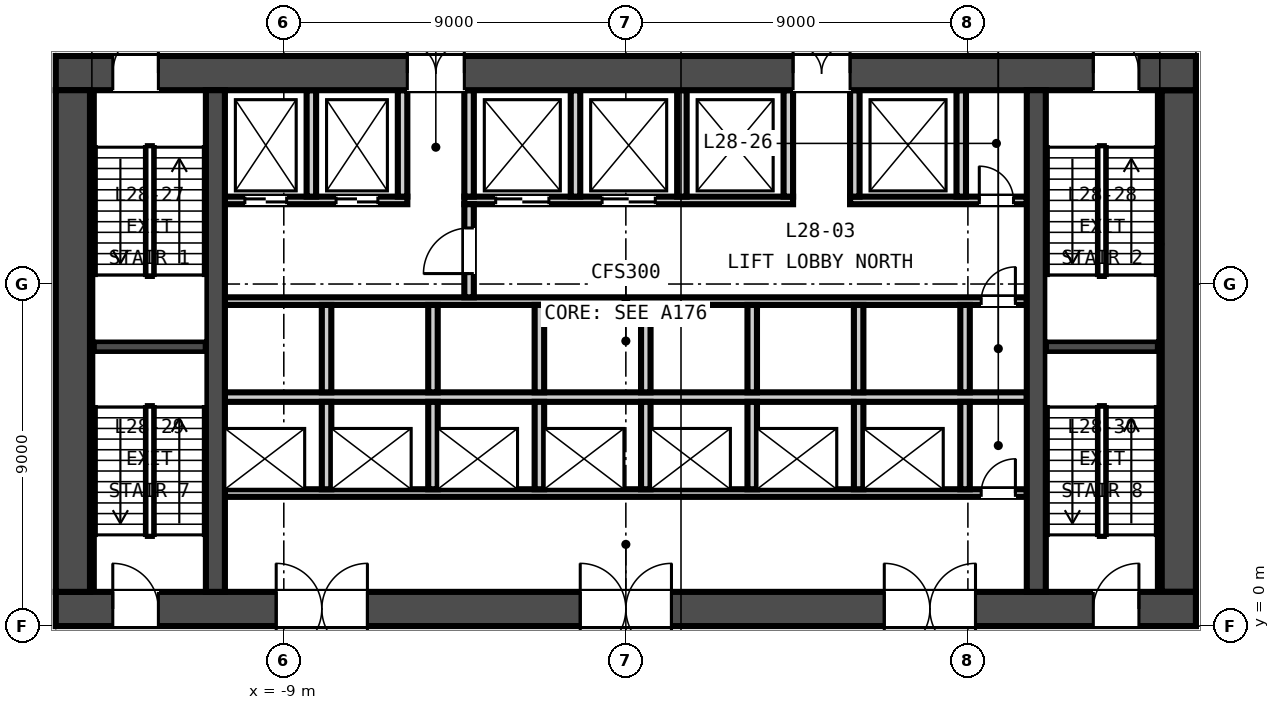
"""IFC4 building model, lengths in metres.
Left out: names, types, materials, properties, quantities, classifications, styles, units other than length and angle.
Written with IfcOpenShell. Run it as: python <this file> out.ifc"""

import sys

from ifc_helpers import new_model, si_unit, direction, frame, frame_2d, origin, place, context, subcontext, project, spatial, rectangle, extrude, element, fill, save


model = new_model("IFC4")
c1 = context("Model", 3, precision=1e-05, world=origin(), true_north=direction((0.0, 1.0)))
c2 = subcontext(c1, "Body", "Model", "MODEL_VIEW")
j1 = project(units=[si_unit("LENGTHUNIT", "METRE"), si_unit("PLANEANGLEUNIT", "RADIAN")], contexts=[c1])
p1 = place(None, origin())
s1 = spatial("IfcSite", under=j1, at=p1, CompositionType="ELEMENT")
p2 = place(p1, origin())
s2 = spatial("IfcBuilding", under=s1, at=p2, CompositionType="ELEMENT")
p3 = place(p2, frame((0.0, 0.0, 117.15)))
s3 = spatial("IfcBuildingStorey", under=s2, at=p3, CompositionType="ELEMENT", Elevation=117.15)
p4 = place(p3, frame((-15.0, 0.45, -0.3), z_axis=(0.0, 0.0, 1.0), x_axis=(1.0, 0.0, 0.0)))
e1 = element("IfcWall", 1, at=p4, inside=s3, PredefinedType="SOLIDWALL", context=c2, shape_type="SweptSolid", body=[
    extrude(rectangle(XDim=30.0, YDim=0.9, at=frame_2d((15.0, 0.0))), origin(), (0.0, 0.0, 1.0), 4.5),
])
p5 = place(p4, frame((5.8, 0.0, 0.3)))
e2 = element("IfcOpeningElement", 2, at=p5, cuts=e1, PredefinedType="OPENING", context=c2, shape_type="SweptSolid", body=[
    extrude(rectangle(XDim=2.4, YDim=2.4, at=frame_2d((1.2, 1.2))), frame((0.0, 0.46, 0.0), z_axis=(0.0, -1.0, 0.0), x_axis=(1.0, 0.0, 0.0)), (0.0, 0.0, 1.0), 0.92),
])
p6 = place(p4, frame((13.8, 0.0, 0.3)))
e3 = element("IfcOpeningElement", 3, at=p6, cuts=e1, PredefinedType="OPENING", context=c2, shape_type="SweptSolid", body=[
    extrude(rectangle(XDim=2.4, YDim=2.4, at=frame_2d((1.2, 1.2))), frame((0.0, 0.46, 0.0), z_axis=(0.0, -1.0, 0.0), x_axis=(1.0, 0.0, 0.0)), (0.0, 0.0, 1.0), 0.92),
])
p7 = place(p4, frame((21.8, 0.0, 0.3)))
e4 = element("IfcOpeningElement", 4, at=p7, cuts=e1, PredefinedType="OPENING", context=c2, shape_type="SweptSolid", body=[
    extrude(rectangle(XDim=2.4, YDim=2.4, at=frame_2d((1.2, 1.2))), frame((0.0, 0.46, 0.0), z_axis=(0.0, -1.0, 0.0), x_axis=(1.0, 0.0, 0.0)), (0.0, 0.0, 1.0), 0.92),
])
p8 = place(p4, frame((1.5, 0.0, 0.3)))
e5 = element("IfcOpeningElement", 5, at=p8, cuts=e1, PredefinedType="OPENING", context=c2, shape_type="SweptSolid", body=[
    extrude(rectangle(XDim=1.2, YDim=2.1, at=frame_2d((0.6, 1.05))), frame((0.0, 0.46, 0.0), z_axis=(0.0, -1.0, 0.0), x_axis=(1.0, 0.0, 0.0)), (0.0, 0.0, 1.0), 0.92),
])
p9 = place(p4, frame((27.3, 0.0, 0.3)))
e6 = element("IfcOpeningElement", 6, at=p9, cuts=e1, PredefinedType="OPENING", context=c2, shape_type="SweptSolid", body=[
    extrude(rectangle(XDim=1.2, YDim=2.1, at=frame_2d((0.6, 1.05))), frame((0.0, 0.46, 0.0), z_axis=(0.0, -1.0, 0.0), x_axis=(1.0, 0.0, 0.0)), (0.0, 0.0, 1.0), 0.92),
])
p10 = place(p3, frame((-15.0, 14.55, -0.3), z_axis=(0.0, 0.0, 1.0), x_axis=(1.0, 0.0, 0.0)))
e7 = element("IfcWall", 7, at=p10, inside=s3, PredefinedType="SOLIDWALL", context=c2, shape_type="SweptSolid", body=[
    extrude(rectangle(XDim=30.0, YDim=0.9, at=frame_2d((15.0, 0.0))), origin(), (0.0, 0.0, 1.0), 4.5),
])
p11 = place(p10, frame((9.25, 0.0, 0.3)))
e8 = element("IfcOpeningElement", 8, at=p11, cuts=e7, PredefinedType="OPENING", context=c2, shape_type="SweptSolid", body=[
    extrude(rectangle(XDim=1.5, YDim=2.1, at=frame_2d((0.75, 1.05))), frame((0.0, 0.46, 0.0), z_axis=(0.0, -1.0, 0.0), x_axis=(1.0, 0.0, 0.0)), (0.0, 0.0, 1.0), 0.92),
])
p12 = place(p10, frame((19.4, 0.0, 0.3)))
e9 = element("IfcOpeningElement", 9, at=p12, cuts=e7, PredefinedType="OPENING", context=c2, shape_type="SweptSolid", body=[
    extrude(rectangle(XDim=1.5, YDim=2.1, at=frame_2d((0.75, 1.05))), frame((0.0, 0.46, 0.0), z_axis=(0.0, -1.0, 0.0), x_axis=(1.0, 0.0, 0.0)), (0.0, 0.0, 1.0), 0.92),
])
p13 = place(p10, frame((1.5, 0.0, 0.3)))
e10 = element("IfcOpeningElement", 10, at=p13, cuts=e7, PredefinedType="OPENING", context=c2, shape_type="SweptSolid", body=[
    extrude(rectangle(XDim=1.2, YDim=2.1, at=frame_2d((0.6, 1.05))), frame((0.0, 0.46, 0.0), z_axis=(0.0, -1.0, 0.0), x_axis=(1.0, 0.0, 0.0)), (0.0, 0.0, 1.0), 0.92),
])
p14 = place(p10, frame((27.3, 0.0, 0.3)))
e11 = element("IfcOpeningElement", 11, at=p14, cuts=e7, PredefinedType="OPENING", context=c2, shape_type="SweptSolid", body=[
    extrude(rectangle(XDim=1.2, YDim=2.1, at=frame_2d((0.6, 1.05))), frame((0.0, 0.46, 0.0), z_axis=(0.0, -1.0, 0.0), x_axis=(1.0, 0.0, 0.0)), (0.0, 0.0, 1.0), 0.92),
])
for number, where, z_axis, x_axis in (
    (12, (-14.55, 0.9, -0.3), (0.0, 0.0, 1.0), (0.0, 1.0, 0.0)),
    (13, (14.55, 0.9, -0.3), (0.0, 0.0, 1.0), (0.0, 1.0, 0.0)),
):
    element("IfcWall", number, at=place(p3, frame(where, z_axis=z_axis, x_axis=x_axis)), inside=s3, PredefinedType="SOLIDWALL", context=c2, shape_type="SweptSolid", body=[
        extrude(rectangle(XDim=13.2, YDim=0.9, at=frame_2d((6.6, 0.0))), origin(), (0.0, 0.0, 1.0), 4.5),
    ])
for number, where, z_axis, x_axis in (
    (14, (-10.8, 0.9, -0.3), (0.0, 0.0, 1.0), (0.0, 1.0, 0.0)),
    (15, (10.8, 0.9, -0.3), (0.0, 0.0, 1.0), (0.0, 1.0, 0.0)),
):
    element("IfcWall", number, at=place(p3, frame(where, z_axis=z_axis, x_axis=x_axis)), inside=s3, PredefinedType="SOLIDWALL", context=c2, shape_type="SweptSolid", body=[
        extrude(rectangle(XDim=13.2, YDim=0.5, at=frame_2d((6.6, 0.0))), origin(), (0.0, 0.0, 1.0), 4.5),
    ])
p15 = place(p3, frame((-10.55, 3.5, 0.0), z_axis=(0.0, 0.0, 1.0), x_axis=(1.0, 0.0, 0.0)))
e16 = element("IfcWall", 16, at=p15, inside=s3, PredefinedType="PARTITIONING", context=c2, shape_type="SweptSolid", body=[
    extrude(rectangle(XDim=21.1, YDim=0.2, at=frame_2d((10.55, 0.0))), origin(), (0.0, 0.0, 1.0), 4.2),
])
p16 = place(p15, frame((19.9, 0.0, 0.0)))
e17 = element("IfcOpeningElement", 17, at=p16, cuts=e16, PredefinedType="OPENING", context=c2, shape_type="SweptSolid", body=[
    extrude(rectangle(XDim=0.9, YDim=2.1, at=frame_2d((0.45, 1.05))), frame((0.0, 0.11, 0.0), z_axis=(0.0, -1.0, 0.0), x_axis=(1.0, 0.0, 0.0)), (0.0, 0.0, 1.0), 0.22),
])
p17 = place(p3, frame((-10.55, 6.025, 0.0), z_axis=(0.0, 0.0, 1.0), x_axis=(1.0, 0.0, 0.0)))
e18 = element("IfcWall", 18, at=p17, inside=s3, PredefinedType="PARTITIONING", context=c2, shape_type="SweptSolid", body=[
    extrude(rectangle(XDim=21.1, YDim=0.25, at=frame_2d((10.55, 0.0))), origin(), (0.0, 0.0, 1.0), 4.2),
])
p18 = place(p3, frame((-10.55, 8.55, 0.0), z_axis=(0.0, 0.0, 1.0), x_axis=(1.0, 0.0, 0.0)))
e19 = element("IfcWall", 19, at=p18, inside=s3, PredefinedType="PARTITIONING", context=c2, shape_type="SweptSolid", body=[
    extrude(rectangle(XDim=21.1, YDim=0.2, at=frame_2d((10.55, 0.0))), origin(), (0.0, 0.0, 1.0), 4.2),
])
p19 = place(p18, frame((19.9, 0.0, 0.0)))
e20 = element("IfcOpeningElement", 20, at=p19, cuts=e19, PredefinedType="OPENING", context=c2, shape_type="SweptSolid", body=[
    extrude(rectangle(XDim=0.9, YDim=2.1, at=frame_2d((0.45, 1.05))), frame((0.0, 0.11, 0.0), z_axis=(0.0, -1.0, 0.0), x_axis=(1.0, 0.0, 0.0)), (0.0, 0.0, 1.0), 0.22),
])
p20 = place(p3, frame((-10.55, 11.2, 0.0), z_axis=(0.0, 0.0, 1.0), x_axis=(1.0, 0.0, 0.0)))
e21 = element("IfcWall", 21, at=p20, inside=s3, PredefinedType="PARTITIONING", context=c2, shape_type="SweptSolid", body=[
    extrude(rectangle(XDim=4.8, YDim=0.2, at=frame_2d((2.4, 0.0))), origin(), (0.0, 0.0, 1.0), 4.2),
])
p21 = place(p20, frame((0.525, 0.0, 0.0)))
e22 = element("IfcOpeningElement", 22, at=p21, cuts=e21, PredefinedType="OPENING", context=c2, shape_type="SweptSolid", body=[
    extrude(rectangle(XDim=1.1, YDim=2.1, at=frame_2d((0.55, 1.05))), frame((0.0, 0.11, 0.0), z_axis=(0.0, -1.0, 0.0), x_axis=(1.0, 0.0, 0.0)), (0.0, 0.0, 1.0), 0.22),
])
p22 = place(p20, frame((2.925, 0.0, 0.0)))
e23 = element("IfcOpeningElement", 23, at=p22, cuts=e21, PredefinedType="OPENING", context=c2, shape_type="SweptSolid", body=[
    extrude(rectangle(XDim=1.1, YDim=2.1, at=frame_2d((0.55, 1.05))), frame((0.0, 0.11, 0.0), z_axis=(0.0, -1.0, 0.0), x_axis=(1.0, 0.0, 0.0)), (0.0, 0.0, 1.0), 0.22),
])
p23 = place(p3, frame((-4.25, 11.2, 0.0), z_axis=(0.0, 0.0, 1.0), x_axis=(1.0, 0.0, 0.0)))
e24 = element("IfcWall", 24, at=p23, inside=s3, PredefinedType="PARTITIONING", context=c2, shape_type="SweptSolid", body=[
    extrude(rectangle(XDim=8.65, YDim=0.2, at=frame_2d((4.325, 0.0))), origin(), (0.0, 0.0, 1.0), 4.2),
])
p24 = place(p23, frame((0.825, 0.0, 0.0)))
e25 = element("IfcOpeningElement", 25, at=p24, cuts=e24, PredefinedType="OPENING", context=c2, shape_type="SweptSolid", body=[
    extrude(rectangle(XDim=1.4, YDim=2.1, at=frame_2d((0.7, 1.05))), frame((0.0, 0.11, 0.0), z_axis=(0.0, -1.0, 0.0), x_axis=(1.0, 0.0, 0.0)), (0.0, 0.0, 1.0), 0.22),
])
p25 = place(p23, frame((3.625, 0.0, 0.0)))
e26 = element("IfcOpeningElement", 26, at=p25, cuts=e24, PredefinedType="OPENING", context=c2, shape_type="SweptSolid", body=[
    extrude(rectangle(XDim=1.4, YDim=2.1, at=frame_2d((0.7, 1.05))), frame((0.0, 0.11, 0.0), z_axis=(0.0, -1.0, 0.0), x_axis=(1.0, 0.0, 0.0)), (0.0, 0.0, 1.0), 0.22),
])
p26 = place(p3, frame((5.9, 11.2, 0.0), z_axis=(0.0, 0.0, 1.0), x_axis=(1.0, 0.0, 0.0)))
e27 = element("IfcWall", 27, at=p26, inside=s3, PredefinedType="PARTITIONING", context=c2, shape_type="SweptSolid", body=[
    extrude(rectangle(XDim=4.65, YDim=0.2, at=frame_2d((2.325, 0.0))), origin(), (0.0, 0.0, 1.0), 4.2),
])
p27 = place(p26, frame((3.4, 0.0, 0.0)))
e28 = element("IfcOpeningElement", 28, at=p27, cuts=e27, PredefinedType="OPENING", context=c2, shape_type="SweptSolid", body=[
    extrude(rectangle(XDim=0.9, YDim=2.1, at=frame_2d((0.45, 1.05))), frame((0.0, 0.11, 0.0), z_axis=(0.0, -1.0, 0.0), x_axis=(1.0, 0.0, 0.0)), (0.0, 0.0, 1.0), 0.22),
])
p28 = place(p3, frame((-4.125, 8.65, 0.0), z_axis=(0.0, 0.0, 1.0), x_axis=(0.0, 1.0, 0.0)))
e29 = element("IfcWall", 29, at=p28, inside=s3, PredefinedType="PARTITIONING", context=c2, shape_type="SweptSolid", body=[
    extrude(rectangle(XDim=2.45, YDim=0.25, at=frame_2d((1.225, 0.0))), origin(), (0.0, 0.0, 1.0), 4.2),
])
p29 = place(p28, frame((0.625, 0.0, 0.0)))
e30 = element("IfcOpeningElement", 30, at=p29, cuts=e29, PredefinedType="OPENING", context=c2, shape_type="SweptSolid", body=[
    extrude(rectangle(XDim=1.2, YDim=2.1, at=frame_2d((0.6, 1.05))), frame((0.0, 0.135, 0.0), z_axis=(0.0, -1.0, 0.0), x_axis=(1.0, 0.0, 0.0)), (0.0, 0.0, 1.0), 0.27),
])
for number, where, z_axis, x_axis in (
    (31, (-7.875, 3.6, 0.0), (0.0, 0.0, 1.0), (0.0, 1.0, 0.0)),
    (32, (-5.075, 3.6, 0.0), (0.0, 0.0, 1.0), (0.0, 1.0, 0.0)),
    (33, (-2.275, 3.6, 0.0), (0.0, 0.0, 1.0), (0.0, 1.0, 0.0)),
    (34, (0.525, 3.6, 0.0), (0.0, 0.0, 1.0), (0.0, 1.0, 0.0)),
    (35, (3.325, 3.6, 0.0), (0.0, 0.0, 1.0), (0.0, 1.0, 0.0)),
    (36, (6.125, 3.6, 0.0), (0.0, 0.0, 1.0), (0.0, 1.0, 0.0)),
    (37, (8.925, 3.6, 0.0), (0.0, 0.0, 1.0), (0.0, 1.0, 0.0)),
):
    element("IfcWall", number, at=place(p3, frame(where, z_axis=z_axis, x_axis=x_axis)), inside=s3, PredefinedType="PARTITIONING", context=c2, shape_type="SweptSolid", body=[
        extrude(rectangle(XDim=2.3, YDim=0.25, at=frame_2d((1.15, 0.0))), origin(), (0.0, 0.0, 1.0), 4.2),
    ])
for number, where, z_axis, x_axis in (
    (38, (-7.875, 6.15, 0.0), (0.0, 0.0, 1.0), (0.0, 1.0, 0.0)),
    (39, (-5.075, 6.15, 0.0), (0.0, 0.0, 1.0), (0.0, 1.0, 0.0)),
    (40, (-2.275, 6.15, 0.0), (0.0, 0.0, 1.0), (0.0, 1.0, 0.0)),
    (41, (0.525, 6.15, 0.0), (0.0, 0.0, 1.0), (0.0, 1.0, 0.0)),
    (42, (3.325, 6.15, 0.0), (0.0, 0.0, 1.0), (0.0, 1.0, 0.0)),
    (43, (6.125, 6.15, 0.0), (0.0, 0.0, 1.0), (0.0, 1.0, 0.0)),
    (44, (8.925, 6.15, 0.0), (0.0, 0.0, 1.0), (0.0, 1.0, 0.0)),
):
    element("IfcWall", number, at=place(p3, frame(where, z_axis=z_axis, x_axis=x_axis)), inside=s3, PredefinedType="PARTITIONING", context=c2, shape_type="SweptSolid", body=[
        extrude(rectangle(XDim=2.3, YDim=0.25, at=frame_2d((1.15, 0.0))), origin(), (0.0, 0.0, 1.0), 4.2),
    ])
for number, where, z_axis, x_axis in (
    (45, (-8.275, 11.3, 0.0), (0.0, 0.0, 1.0), (0.0, 1.0, 0.0)),
    (46, (-5.875, 11.3, 0.0), (0.0, 0.0, 1.0), (0.0, 1.0, 0.0)),
    (47, (-4.125, 11.3, 0.0), (0.0, 0.0, 1.0), (0.0, 1.0, 0.0)),
    (48, (-1.325, 11.3, 0.0), (0.0, 0.0, 1.0), (0.0, 1.0, 0.0)),
    (49, (1.475, 11.3, 0.0), (0.0, 0.0, 1.0), (0.0, 1.0, 0.0)),
    (50, (4.275, 11.3, 0.0), (0.0, 0.0, 1.0), (0.0, 1.0, 0.0)),
    (51, (6.025, 11.3, 0.0), (0.0, 0.0, 1.0), (0.0, 1.0, 0.0)),
    (52, (8.825, 11.3, 0.0), (0.0, 0.0, 1.0), (0.0, 1.0, 0.0)),
):
    element("IfcWall", number, at=place(p3, frame(where, z_axis=z_axis, x_axis=x_axis)), inside=s3, PredefinedType="PARTITIONING", context=c2, shape_type="SweptSolid", body=[
        extrude(rectangle(XDim=2.8, YDim=0.25, at=frame_2d((1.4, 0.0))), origin(), (0.0, 0.0, 1.0), 4.2),
    ])
p30 = place(p3, frame((-14.0, 7.35, 0.0), z_axis=(0.0, 0.0, 1.0), x_axis=(1.0, 0.0, 0.0)))
e53 = element("IfcWall", 53, at=p30, inside=s3, PredefinedType="SOLIDWALL", context=c2, shape_type="SweptSolid", body=[
    extrude(rectangle(XDim=2.95, YDim=0.3, at=frame_2d((1.475, 0.0))), origin(), (0.0, 0.0, 1.0), 4.2),
])
p31 = place(p3, frame((-14.05, 0.9, 0.0), z_axis=(0.0, 0.0, 1.0), x_axis=(0.0, 1.0, 0.0)))
e54 = element("IfcWall", 54, at=p31, inside=s3, PredefinedType="SOLIDWALL", context=c2, shape_type="SweptSolid", body=[
    extrude(rectangle(XDim=13.2, YDim=0.1, at=frame_2d((6.6, 0.0))), origin(), (0.0, 0.0, 1.0), 4.2),
])
p32 = place(p3, frame((11.05, 7.35, 0.0), z_axis=(0.0, 0.0, 1.0), x_axis=(1.0, 0.0, 0.0)))
e55 = element("IfcWall", 55, at=p32, inside=s3, PredefinedType="SOLIDWALL", context=c2, shape_type="SweptSolid", body=[
    extrude(rectangle(XDim=2.95, YDim=0.3, at=frame_2d((1.475, 0.0))), origin(), (0.0, 0.0, 1.0), 4.2),
])
p33 = place(p3, frame((14.05, 0.9, 0.0), z_axis=(0.0, 0.0, 1.0), x_axis=(0.0, 1.0, 0.0)))
e56 = element("IfcWall", 56, at=p33, inside=s3, PredefinedType="SOLIDWALL", context=c2, shape_type="SweptSolid", body=[
    extrude(rectangle(XDim=13.2, YDim=0.1, at=frame_2d((6.6, 0.0))), origin(), (0.0, 0.0, 1.0), 4.2),
])
p34 = place(p3, frame((14.924, 30.353, 0.0), z_axis=(0.0, 0.0, 1.0), x_axis=(0.669133646521, -0.743142088092, 0.0)))
e57 = element("IfcWall", 57, at=p34, inside=s3, PredefinedType="PARTITIONING", context=c2, shape_type="SweptSolid", body=[
    extrude(rectangle(XDim=34.413, YDim=0.2, at=frame_2d((17.207, 0.0))), origin(), (0.0, 0.0, 1.0), 4.2),
])
p35 = place(p29, origin())
e58 = element("IfcDoor", 58, at=p35, inside=s3, OperationType="SINGLE_SWING_LEFT", PredefinedType="DOOR", context=c2, shape_type="SweptSolid", body=[
    extrude(rectangle(XDim=1.2, YDim=2.1, at=frame_2d((0.6, 1.05))), frame((0.0, 0.025, 0.0), z_axis=(0.0, -1.0, 0.0), x_axis=(1.0, 0.0, 0.0)), (0.0, 0.0, 1.0), 0.05),
])
fill(e30, e58)
p36 = place(p16, origin())
e59 = element("IfcDoor", 59, at=p36, inside=s3, OperationType="SINGLE_SWING_RIGHT", PredefinedType="DOOR", context=c2, shape_type="SweptSolid", body=[
    extrude(rectangle(XDim=0.9, YDim=2.1, at=frame_2d((0.45, 1.05))), frame((0.0, 0.025, 0.0), z_axis=(0.0, -1.0, 0.0), x_axis=(1.0, 0.0, 0.0)), (0.0, 0.0, 1.0), 0.05),
])
fill(e17, e59)
p37 = place(p19, origin())
e60 = element("IfcDoor", 60, at=p37, inside=s3, OperationType="SINGLE_SWING_RIGHT", PredefinedType="DOOR", context=c2, shape_type="SweptSolid", body=[
    extrude(rectangle(XDim=0.9, YDim=2.1, at=frame_2d((0.45, 1.05))), frame((0.0, 0.025, 0.0), z_axis=(0.0, -1.0, 0.0), x_axis=(1.0, 0.0, 0.0)), (0.0, 0.0, 1.0), 0.05),
])
fill(e20, e60)
p38 = place(p21, origin())
e61 = element("IfcDoor", 61, at=p38, inside=s3, OperationType="DOUBLE_DOOR_SLIDING", PredefinedType="DOOR", context=c2, shape_type="SweptSolid", body=[
    extrude(rectangle(XDim=1.1, YDim=2.1, at=frame_2d((0.55, 1.05))), frame((0.0, 0.025, 0.0), z_axis=(0.0, -1.0, 0.0), x_axis=(1.0, 0.0, 0.0)), (0.0, 0.0, 1.0), 0.05),
])
fill(e22, e61)
p39 = place(p22, origin())
e62 = element("IfcDoor", 62, at=p39, inside=s3, OperationType="DOUBLE_DOOR_SLIDING", PredefinedType="DOOR", context=c2, shape_type="SweptSolid", body=[
    extrude(rectangle(XDim=1.1, YDim=2.1, at=frame_2d((0.55, 1.05))), frame((0.0, 0.025, 0.0), z_axis=(0.0, -1.0, 0.0), x_axis=(1.0, 0.0, 0.0)), (0.0, 0.0, 1.0), 0.05),
])
fill(e23, e62)
p40 = place(p24, origin())
e63 = element("IfcDoor", 63, at=p40, inside=s3, OperationType="DOUBLE_DOOR_SLIDING", PredefinedType="DOOR", context=c2, shape_type="SweptSolid", body=[
    extrude(rectangle(XDim=1.4, YDim=2.1, at=frame_2d((0.7, 1.05))), frame((0.0, 0.025, 0.0), z_axis=(0.0, -1.0, 0.0), x_axis=(1.0, 0.0, 0.0)), (0.0, 0.0, 1.0), 0.05),
])
fill(e25, e63)
p41 = place(p25, origin())
e64 = element("IfcDoor", 64, at=p41, inside=s3, OperationType="DOUBLE_DOOR_SLIDING", PredefinedType="DOOR", context=c2, shape_type="SweptSolid", body=[
    extrude(rectangle(XDim=1.4, YDim=2.1, at=frame_2d((0.7, 1.05))), frame((0.0, 0.025, 0.0), z_axis=(0.0, -1.0, 0.0), x_axis=(1.0, 0.0, 0.0)), (0.0, 0.0, 1.0), 0.05),
])
fill(e26, e64)
p42 = place(p27, origin())
e65 = element("IfcDoor", 65, at=p42, inside=s3, OperationType="SINGLE_SWING_LEFT", PredefinedType="DOOR", context=c2, shape_type="SweptSolid", body=[
    extrude(rectangle(XDim=0.9, YDim=2.1, at=frame_2d((0.45, 1.05))), frame((0.0, 0.025, 0.0), z_axis=(0.0, -1.0, 0.0), x_axis=(1.0, 0.0, 0.0)), (0.0, 0.0, 1.0), 0.05),
])
fill(e28, e65)
p43 = place(p5, origin())
e66 = element("IfcDoor", 66, at=p43, inside=s3, OperationType="DOUBLE_DOOR_DOUBLE_SWING", PredefinedType="DOOR", context=c2, shape_type="SweptSolid", body=[
    extrude(rectangle(XDim=2.4, YDim=2.4, at=frame_2d((1.2, 1.2))), frame((0.0, 0.025, 0.0), z_axis=(0.0, -1.0, 0.0), x_axis=(1.0, 0.0, 0.0)), (0.0, 0.0, 1.0), 0.05),
])
fill(e2, e66)
p44 = place(p6, origin())
e67 = element("IfcDoor", 67, at=p44, inside=s3, OperationType="DOUBLE_DOOR_DOUBLE_SWING", PredefinedType="DOOR", context=c2, shape_type="SweptSolid", body=[
    extrude(rectangle(XDim=2.4, YDim=2.4, at=frame_2d((1.2, 1.2))), frame((0.0, 0.025, 0.0), z_axis=(0.0, -1.0, 0.0), x_axis=(1.0, 0.0, 0.0)), (0.0, 0.0, 1.0), 0.05),
])
fill(e3, e67)
p45 = place(p7, origin())
e68 = element("IfcDoor", 68, at=p45, inside=s3, OperationType="DOUBLE_DOOR_DOUBLE_SWING", PredefinedType="DOOR", context=c2, shape_type="SweptSolid", body=[
    extrude(rectangle(XDim=2.4, YDim=2.4, at=frame_2d((1.2, 1.2))), frame((0.0, 0.025, 0.0), z_axis=(0.0, -1.0, 0.0), x_axis=(1.0, 0.0, 0.0)), (0.0, 0.0, 1.0), 0.05),
])
fill(e4, e68)
p46 = place(p11, origin())
e69 = element("IfcDoor", 69, at=p46, inside=s3, OperationType="DOUBLE_DOOR_SINGLE_SWING", PredefinedType="DOOR", context=c2, shape_type="SweptSolid", body=[
    extrude(rectangle(XDim=1.5, YDim=2.1, at=frame_2d((0.75, 1.05))), frame((0.0, 0.025, 0.0), z_axis=(0.0, -1.0, 0.0), x_axis=(1.0, 0.0, 0.0)), (0.0, 0.0, 1.0), 0.05),
])
fill(e8, e69)
p47 = place(p12, origin())
e70 = element("IfcDoor", 70, at=p47, inside=s3, OperationType="DOUBLE_DOOR_SINGLE_SWING", PredefinedType="DOOR", context=c2, shape_type="SweptSolid", body=[
    extrude(rectangle(XDim=1.5, YDim=2.1, at=frame_2d((0.75, 1.05))), frame((0.0, 0.025, 0.0), z_axis=(0.0, -1.0, 0.0), x_axis=(1.0, 0.0, 0.0)), (0.0, 0.0, 1.0), 0.05),
])
fill(e9, e70)
p48 = place(p13, origin())
e71 = element("IfcDoor", 71, at=p48, inside=s3, OperationType="SINGLE_SWING_RIGHT", PredefinedType="DOOR", context=c2, shape_type="SweptSolid", body=[
    extrude(rectangle(XDim=1.2, YDim=2.1, at=frame_2d((0.6, 1.05))), frame((0.0, 0.025, 0.0), z_axis=(0.0, -1.0, 0.0), x_axis=(1.0, 0.0, 0.0)), (0.0, 0.0, 1.0), 0.05),
])
fill(e10, e71)
p49 = place(p14, origin())
e72 = element("IfcDoor", 72, at=p49, inside=s3, OperationType="SINGLE_SWING_LEFT", PredefinedType="DOOR", context=c2, shape_type="SweptSolid", body=[
    extrude(rectangle(XDim=1.2, YDim=2.1, at=frame_2d((0.6, 1.05))), frame((0.0, 0.025, 0.0), z_axis=(0.0, -1.0, 0.0), x_axis=(1.0, 0.0, 0.0)), (0.0, 0.0, 1.0), 0.05),
])
fill(e11, e72)
p50 = place(p8, origin())
e73 = element("IfcDoor", 73, at=p50, inside=s3, OperationType="SINGLE_SWING_LEFT", PredefinedType="DOOR", context=c2, shape_type="SweptSolid", body=[
    extrude(rectangle(XDim=1.2, YDim=2.1, at=frame_2d((0.6, 1.05))), frame((0.0, 0.025, 0.0), z_axis=(0.0, -1.0, 0.0), x_axis=(1.0, 0.0, 0.0)), (0.0, 0.0, 1.0), 0.05),
])
fill(e5, e73)
p51 = place(p9, origin())
e74 = element("IfcDoor", 74, at=p51, inside=s3, OperationType="SINGLE_SWING_RIGHT", PredefinedType="DOOR", context=c2, shape_type="SweptSolid", body=[
    extrude(rectangle(XDim=1.2, YDim=2.1, at=frame_2d((0.6, 1.05))), frame((0.0, 0.025, 0.0), z_axis=(0.0, -1.0, 0.0), x_axis=(1.0, 0.0, 0.0)), (0.0, 0.0, 1.0), 0.05),
])
fill(e6, e74)
save(model, sys.argv[1])
